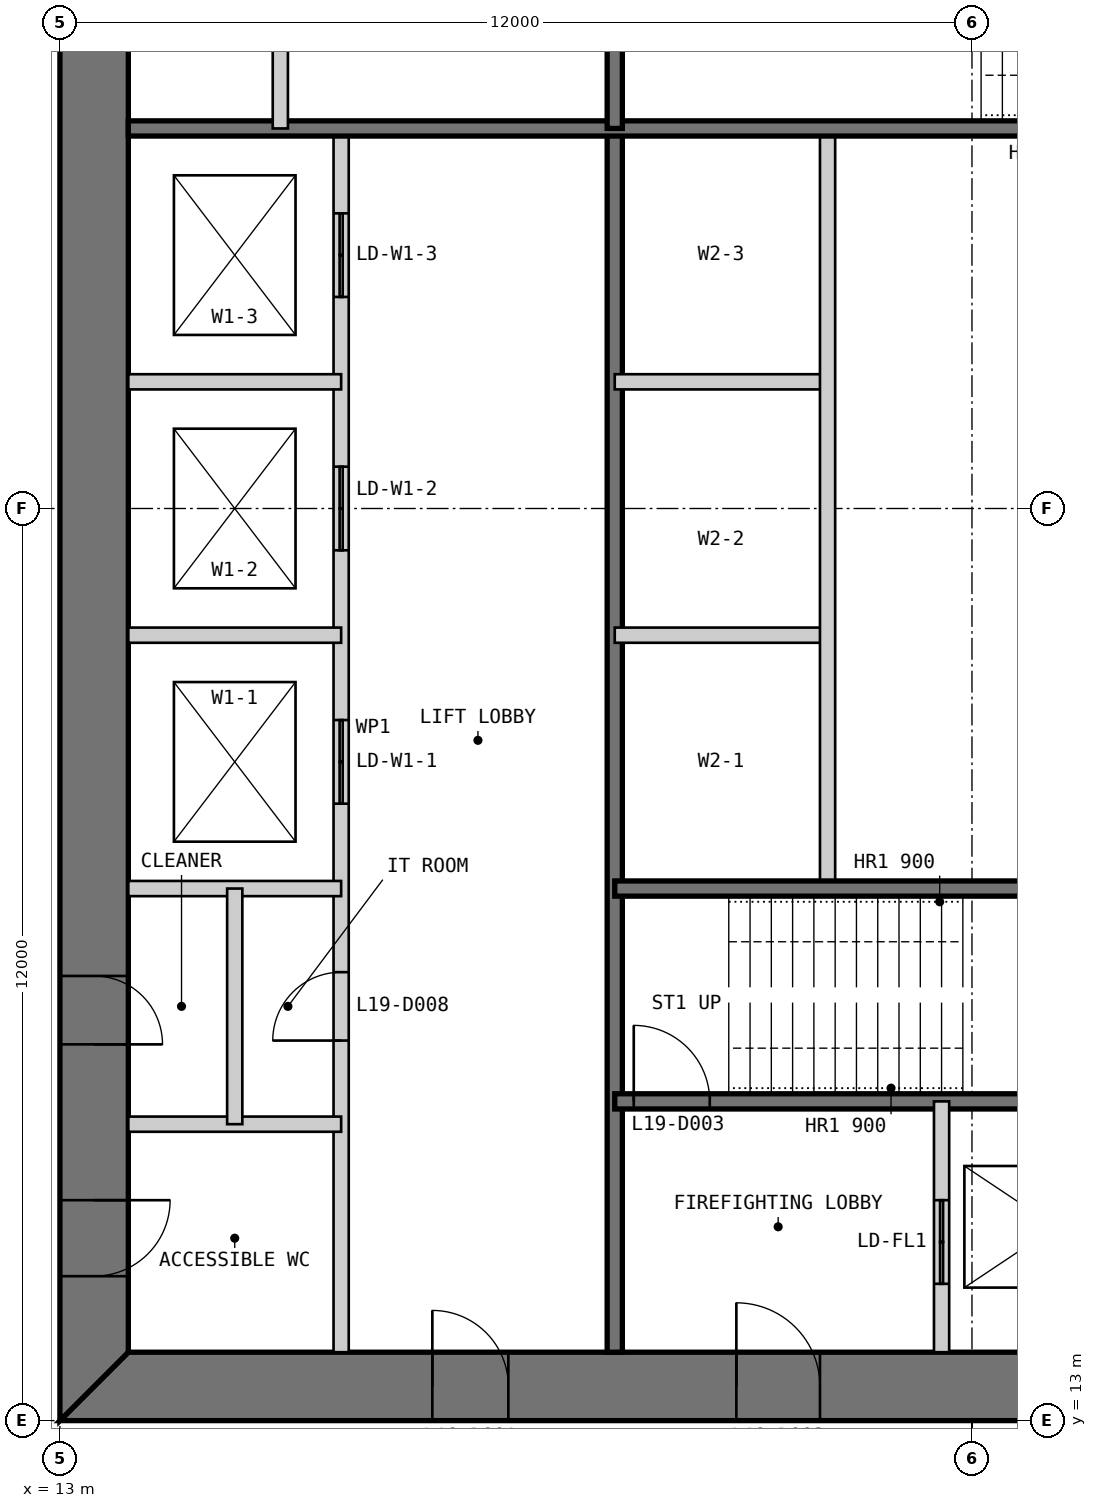
"""IFC4 building model, lengths in metres.
Left out: names, types, materials, properties, quantities, classifications, styles, units other than length and angle.
Written with IfcOpenShell. Run it as: python <this file> out.ifc"""

import sys

from ifc_helpers import new_model, si_unit, direction, frame, frame_2d, origin, place, context, subcontext, project, spatial, polyline, rectangle, outline, extrude, element, fill, save


model = new_model("IFC4")
c1 = context("Model", 3, precision=1e-05, world=origin(), true_north=direction((0.0, 1.0)))
c2 = subcontext(c1, "Body", "Model", "MODEL_VIEW")
j1 = project(units=[si_unit("LENGTHUNIT", "METRE"), si_unit("PLANEANGLEUNIT", "RADIAN")], contexts=[c1])
p1 = place(None, origin())
s1 = spatial("IfcSite", under=j1, at=p1, CompositionType="ELEMENT")
p2 = place(p1, origin())
s2 = spatial("IfcBuilding", under=s1, at=p2, CompositionType="ELEMENT")
p3 = place(p2, frame((0.0, 0.0, 83.0)))
s3 = spatial("IfcBuildingStorey", under=s2, at=p3, CompositionType="ELEMENT", Elevation=83.0)
p4 = place(p3, frame((13.0, 13.45, 0.0), z_axis=(0.0, 0.0, 1.0), x_axis=(1.0, 0.0, 0.0)))
e1 = element("IfcWall", 1, at=p4, inside=s3, PredefinedType="SHEAR", context=c2, shape_type="SweptSolid", body=[
    extrude(outline(polyline([(0.0, -0.45), (24.0, -0.45), (23.1, 0.45), (0.9, 0.45), (0.0, -0.45)])), origin(), (0.0, 0.0, 1.0), 4.0),
])
p5 = place(p4, frame((4.9, 0.0, 0.0)))
e2 = element("IfcOpeningElement", 2, at=p5, cuts=e1, PredefinedType="OPENING", context=c2, shape_type="SweptSolid", body=[
    extrude(rectangle(XDim=1.0, YDim=2.2, at=frame_2d((0.5, 1.1))), frame((0.0, 0.46, 0.0), z_axis=(0.0, -1.0, 0.0), x_axis=(1.0, 0.0, 0.0)), (0.0, 0.0, 1.0), 0.92),
])
p6 = place(p4, frame((8.9, 0.0, 0.0)))
e3 = element("IfcOpeningElement", 3, at=p6, cuts=e1, PredefinedType="OPENING", context=c2, shape_type="SweptSolid", body=[
    extrude(rectangle(XDim=1.1, YDim=2.2, at=frame_2d((0.55, 1.1))), frame((0.0, 0.46, 0.0), z_axis=(0.0, -1.0, 0.0), x_axis=(1.0, 0.0, 0.0)), (0.0, 0.0, 1.0), 0.92),
])
p7 = place(p4, frame((15.05, 0.0, 0.0)))
e4 = element("IfcOpeningElement", 4, at=p7, cuts=e1, PredefinedType="OPENING", context=c2, shape_type="SweptSolid", body=[
    extrude(rectangle(XDim=0.9, YDim=2.2, at=frame_2d((0.45, 1.1))), frame((0.0, 0.46, 0.0), z_axis=(0.0, -1.0, 0.0), x_axis=(1.0, 0.0, 0.0)), (0.0, 0.0, 1.0), 0.92),
])
p8 = place(p4, frame((17.9, 0.0, 0.0)))
e5 = element("IfcOpeningElement", 5, at=p8, cuts=e1, PredefinedType="OPENING", context=c2, shape_type="SweptSolid", body=[
    extrude(rectangle(XDim=1.0, YDim=2.2, at=frame_2d((0.5, 1.1))), frame((0.0, 0.46, 0.0), z_axis=(0.0, -1.0, 0.0), x_axis=(1.0, 0.0, 0.0)), (0.0, 0.0, 1.0), 0.92),
])
p9 = place(p4, frame((21.4, 0.0, 0.0)))
e6 = element("IfcOpeningElement", 6, at=p9, cuts=e1, PredefinedType="OPENING", context=c2, shape_type="SweptSolid", body=[
    extrude(rectangle(XDim=1.0, YDim=2.2, at=frame_2d((0.5, 1.1))), frame((0.0, 0.46, 0.0), z_axis=(0.0, -1.0, 0.0), x_axis=(1.0, 0.0, 0.0)), (0.0, 0.0, 1.0), 0.92),
])
p10 = place(p3, frame((13.45, 36.1, 0.0), z_axis=(0.0, 0.0, 1.0), x_axis=(0.0, -1.0, 0.0)))
e7 = element("IfcWall", 7, at=p10, inside=s3, PredefinedType="SHEAR", context=c2, shape_type="SweptSolid", body=[
    extrude(outline(polyline([(-0.9, -0.45), (23.1, -0.45), (22.2, 0.45), (0.0, 0.45), (-0.9, -0.45)])), origin(), (0.0, 0.0, 1.0), 4.0),
])
p11 = place(p10, frame((20.2, 0.0, 0.0)))
e8 = element("IfcOpeningElement", 8, at=p11, cuts=e7, PredefinedType="OPENING", context=c2, shape_type="SweptSolid", body=[
    extrude(rectangle(XDim=1.0, YDim=2.2, at=frame_2d((0.5, 1.1))), frame((0.0, 0.46, 0.0), z_axis=(0.0, -1.0, 0.0), x_axis=(1.0, 0.0, 0.0)), (0.0, 0.0, 1.0), 0.92),
])
p12 = place(p10, frame((17.25, 0.0, 0.0)))
e9 = element("IfcOpeningElement", 9, at=p12, cuts=e7, PredefinedType="OPENING", context=c2, shape_type="SweptSolid", body=[
    extrude(rectangle(XDim=0.9, YDim=2.2, at=frame_2d((0.45, 1.1))), frame((0.0, 0.46, 0.0), z_axis=(0.0, -1.0, 0.0), x_axis=(1.0, 0.0, 0.0)), (0.0, 0.0, 1.0), 0.92),
])
p13 = place(p3, frame((16.7, 13.9, 0.0), z_axis=(0.0, 0.0, 1.0), x_axis=(0.0, 1.0, 0.0)))
e10 = element("IfcWall", 10, at=p13, inside=s3, PredefinedType="PARTITIONING", context=c2, shape_type="SweptSolid", body=[
    extrude(rectangle(XDim=16.1, YDim=0.2, at=frame_2d((8.05, 0.0))), origin(), (0.0, 0.0, 1.0), 3.8),
])
p14 = place(p13, frame((4.1, 0.0, 0.0)))
e11 = element("IfcOpeningElement", 11, at=p14, cuts=e10, PredefinedType="OPENING", context=c2, shape_type="SweptSolid", body=[
    extrude(rectangle(XDim=0.9, YDim=2.2, at=frame_2d((0.45, 1.1))), frame((0.0, 0.11, 0.0), z_axis=(0.0, -1.0, 0.0), x_axis=(1.0, 0.0, 0.0)), (0.0, 0.0, 1.0), 0.22),
])
p15 = place(p13, frame((7.217, 0.0, 0.0)))
e12 = element("IfcOpeningElement", 12, at=p15, cuts=e10, PredefinedType="OPENING", context=c2, shape_type="SweptSolid", body=[
    extrude(rectangle(XDim=1.1, YDim=2.2, at=frame_2d((0.55, 1.1))), frame((0.0, 0.11, 0.0), z_axis=(0.0, -1.0, 0.0), x_axis=(1.0, 0.0, 0.0)), (0.0, 0.0, 1.0), 0.22),
])
p16 = place(p13, frame((10.55, 0.0, 0.0)))
e13 = element("IfcOpeningElement", 13, at=p16, cuts=e10, PredefinedType="OPENING", context=c2, shape_type="SweptSolid", body=[
    extrude(rectangle(XDim=1.1, YDim=2.2, at=frame_2d((0.55, 1.1))), frame((0.0, 0.11, 0.0), z_axis=(0.0, -1.0, 0.0), x_axis=(1.0, 0.0, 0.0)), (0.0, 0.0, 1.0), 0.22),
])
p17 = place(p13, frame((13.883, 0.0, 0.0)))
e14 = element("IfcOpeningElement", 14, at=p17, cuts=e10, PredefinedType="OPENING", context=c2, shape_type="SweptSolid", body=[
    extrude(rectangle(XDim=1.1, YDim=2.2, at=frame_2d((0.55, 1.1))), frame((0.0, 0.11, 0.0), z_axis=(0.0, -1.0, 0.0), x_axis=(1.0, 0.0, 0.0)), (0.0, 0.0, 1.0), 0.22),
])
p18 = place(p3, frame((20.3, 13.9, 0.0), z_axis=(0.0, 0.0, 1.0), x_axis=(0.0, 1.0, 0.0)))
e15 = element("IfcWall", 15, at=p18, inside=s3, PredefinedType="SOLIDWALL", context=c2, shape_type="SweptSolid", body=[
    extrude(rectangle(XDim=16.1, YDim=0.2, at=frame_2d((8.05, 0.0))), origin(), (0.0, 0.0, 1.0), 3.8),
])
for number, where, z_axis, x_axis in (
    (16, (13.9, 20.0, 0.0), (0.0, 0.0, 1.0), (1.0, 0.0, 0.0)),
    (17, (13.9, 23.333, 0.0), (0.0, 0.0, 1.0), (1.0, 0.0, 0.0)),
    (18, (13.9, 26.667, 0.0), (0.0, 0.0, 1.0), (1.0, 0.0, 0.0)),
    (19, (20.3, 23.333, 0.0), (0.0, 0.0, 1.0), (1.0, 0.0, 0.0)),
    (20, (20.3, 26.667, 0.0), (0.0, 0.0, 1.0), (1.0, 0.0, 0.0)),
):
    element("IfcWall", number, at=place(p3, frame(where, z_axis=z_axis, x_axis=x_axis)), inside=s3, PredefinedType="PARTITIONING", context=c2, shape_type="SweptSolid", body=[
        extrude(rectangle(XDim=2.8, YDim=0.2, at=frame_2d((1.4, 0.0))), origin(), (0.0, 0.0, 1.0), 3.8),
    ])
p19 = place(p3, frame((23.1, 20.0, 0.0), z_axis=(0.0, 0.0, 1.0), x_axis=(0.0, 1.0, 0.0)))
e21 = element("IfcWall", 21, at=p19, inside=s3, PredefinedType="PARTITIONING", context=c2, shape_type="SweptSolid", body=[
    extrude(rectangle(XDim=10.0, YDim=0.2, at=frame_2d((5.0, 0.0))), origin(), (0.0, 0.0, 1.0), 3.8),
])
p20 = place(p3, frame((20.3, 17.2, 0.0), z_axis=(0.0, 0.0, 1.0), x_axis=(1.0, 0.0, 0.0)))
e22 = element("IfcWall", 22, at=p20, inside=s3, PredefinedType="SOLIDWALL", context=c2, shape_type="SweptSolid", body=[
    extrude(rectangle(XDim=9.4, YDim=0.2, at=frame_2d((4.7, 0.0))), origin(), (0.0, 0.0, 1.0), 3.8),
])
p21 = place(p20, frame((0.25, 0.0, 0.0)))
e23 = element("IfcOpeningElement", 23, at=p21, cuts=e22, PredefinedType="OPENING", context=c2, shape_type="SweptSolid", body=[
    extrude(rectangle(XDim=1.0, YDim=2.2, at=frame_2d((0.5, 1.1))), frame((0.0, 0.11, 0.0), z_axis=(0.0, -1.0, 0.0), x_axis=(1.0, 0.0, 0.0)), (0.0, 0.0, 1.0), 0.22),
])
p22 = place(p3, frame((20.3, 20.0, 0.0), z_axis=(0.0, 0.0, 1.0), x_axis=(1.0, 0.0, 0.0)))
e24 = element("IfcWall", 24, at=p22, inside=s3, PredefinedType="SOLIDWALL", context=c2, shape_type="SweptSolid", body=[
    extrude(rectangle(XDim=15.8, YDim=0.2, at=frame_2d((7.9, 0.0))), origin(), (0.0, 0.0, 1.0), 3.8),
])
p23 = place(p3, frame((24.6, 13.9, 0.0), z_axis=(0.0, 0.0, 1.0), x_axis=(0.0, 1.0, 0.0)))
e25 = element("IfcWall", 25, at=p23, inside=s3, PredefinedType="PARTITIONING", context=c2, shape_type="SweptSolid", body=[
    extrude(rectangle(XDim=3.3, YDim=0.2, at=frame_2d((1.65, 0.0))), origin(), (0.0, 0.0, 1.0), 3.8),
])
p24 = place(p23, frame((0.9, 0.0, 0.0)))
e26 = element("IfcOpeningElement", 26, at=p24, cuts=e25, PredefinedType="OPENING", context=c2, shape_type="SweptSolid", body=[
    extrude(rectangle(XDim=1.1, YDim=2.2, at=frame_2d((0.55, 1.1))), frame((0.0, 0.11, 0.0), z_axis=(0.0, -1.0, 0.0), x_axis=(1.0, 0.0, 0.0)), (0.0, 0.0, 1.0), 0.22),
])
p25 = place(p3, frame((13.9, 16.9, 0.0), z_axis=(0.0, 0.0, 1.0), x_axis=(1.0, 0.0, 0.0)))
e27 = element("IfcWall", 27, at=p25, inside=s3, PredefinedType="PARTITIONING", context=c2, shape_type="SweptSolid", body=[
    extrude(rectangle(XDim=2.8, YDim=0.2, at=frame_2d((1.4, 0.0))), origin(), (0.0, 0.0, 1.0), 3.8),
])
p26 = place(p3, frame((15.3, 16.9, 0.0), z_axis=(0.0, 0.0, 1.0), x_axis=(0.0, 1.0, 0.0)))
e28 = element("IfcWall", 28, at=p26, inside=s3, PredefinedType="PARTITIONING", context=c2, shape_type="SweptSolid", body=[
    extrude(rectangle(XDim=3.1, YDim=0.2, at=frame_2d((1.55, 0.0))), origin(), (0.0, 0.0, 1.0), 3.8),
])
p27 = place(p3, frame((29.7, 30.0, 0.0), z_axis=(0.0, 0.0, 1.0), x_axis=(-1.0, 0.0, 0.0)))
e29 = element("IfcWall", 29, at=p27, inside=s3, PredefinedType="SOLIDWALL", context=c2, shape_type="SweptSolid", body=[
    extrude(rectangle(XDim=15.8, YDim=0.2, at=frame_2d((7.9, 0.0))), origin(), (0.0, 0.0, 1.0), 3.8),
])
p28 = place(p3, frame((20.3, 36.1, 0.0), z_axis=(0.0, 0.0, 1.0), x_axis=(0.0, -1.0, 0.0)))
e30 = element("IfcWall", 30, at=p28, inside=s3, PredefinedType="SOLIDWALL", context=c2, shape_type="SweptSolid", body=[
    extrude(rectangle(XDim=6.1, YDim=0.2, at=frame_2d((3.05, 0.0))), origin(), (0.0, 0.0, 1.0), 3.8),
])
p29 = place(p3, frame((15.9, 36.1, 0.0), z_axis=(0.0, 0.0, 1.0), x_axis=(0.0, -1.0, 0.0)))
e31 = element("IfcWall", 31, at=p29, inside=s3, PredefinedType="PARTITIONING", context=c2, shape_type="SweptSolid", body=[
    extrude(rectangle(XDim=6.1, YDim=0.2, at=frame_2d((3.05, 0.0))), origin(), (0.0, 0.0, 1.0), 3.8),
])
p30 = place(p5, origin())
e32 = element("IfcDoor", 32, at=p30, inside=s3, OperationType="SINGLE_SWING_LEFT", PredefinedType="DOOR", context=c2, shape_type="SweptSolid", body=[
    extrude(rectangle(XDim=1.0, YDim=2.2, at=frame_2d((0.5, 1.1))), frame((0.0, 0.025, 0.0), z_axis=(0.0, -1.0, 0.0), x_axis=(1.0, 0.0, 0.0)), (0.0, 0.0, 1.0), 0.05),
    extrude(outline(polyline([(0.0, 0.0), (0.04, 0.0), (0.04, 2.16), (0.96, 2.16), (0.96, 0.0), (1.0, 0.0), (1.0, 2.2), (0.0, 2.2), (0.0, 0.0)])), frame((0.0, 0.3, 0.0), z_axis=(0.0, -1.0, 0.0), x_axis=(1.0, 0.0, 0.0)), (0.0, 0.0, 1.0), 0.6),
])
fill(e2, e32)
p31 = place(p6, origin())
e33 = element("IfcDoor", 33, at=p31, inside=s3, OperationType="SINGLE_SWING_LEFT", PredefinedType="DOOR", context=c2, shape_type="SweptSolid", body=[
    extrude(rectangle(XDim=1.1, YDim=2.2, at=frame_2d((0.55, 1.1))), frame((0.0, 0.025, 0.0), z_axis=(0.0, -1.0, 0.0), x_axis=(1.0, 0.0, 0.0)), (0.0, 0.0, 1.0), 0.05),
    extrude(outline(polyline([(0.0, 0.0), (0.04, 0.0), (0.04, 2.16), (1.06, 2.16), (1.06, 0.0), (1.1, 0.0), (1.1, 2.2), (0.0, 2.2), (0.0, 0.0)])), frame((0.0, 0.3, 0.0), z_axis=(0.0, -1.0, 0.0), x_axis=(1.0, 0.0, 0.0)), (0.0, 0.0, 1.0), 0.6),
])
fill(e3, e33)
p32 = place(p21, origin())
e34 = element("IfcDoor", 34, at=p32, inside=s3, OperationType="SINGLE_SWING_LEFT", PredefinedType="DOOR", context=c2, shape_type="SweptSolid", body=[
    extrude(rectangle(XDim=1.0, YDim=2.2, at=frame_2d((0.5, 1.1))), frame((0.0, 0.025, 0.0), z_axis=(0.0, -1.0, 0.0), x_axis=(1.0, 0.0, 0.0)), (0.0, 0.0, 1.0), 0.05),
])
fill(e23, e34)
p33 = place(p11, origin())
e35 = element("IfcDoor", 35, at=p33, inside=s3, OperationType="SINGLE_SWING_LEFT", PredefinedType="DOOR", context=c2, shape_type="SweptSolid", body=[
    extrude(rectangle(XDim=1.0, YDim=2.2, at=frame_2d((0.5, 1.1))), frame((0.0, 0.025, 0.0), z_axis=(0.0, -1.0, 0.0), x_axis=(1.0, 0.0, 0.0)), (0.0, 0.0, 1.0), 0.05),
    extrude(outline(polyline([(0.0, 0.0), (0.04, 0.0), (0.04, 2.16), (0.96, 2.16), (0.96, 0.0), (1.0, 0.0), (1.0, 2.2), (0.0, 2.2), (0.0, 0.0)])), frame((0.0, 0.3, 0.0), z_axis=(0.0, -1.0, 0.0), x_axis=(1.0, 0.0, 0.0)), (0.0, 0.0, 1.0), 0.6),
])
fill(e8, e35)
p34 = place(p14, origin())
e36 = element("IfcDoor", 36, at=p34, inside=s3, OperationType="SINGLE_SWING_LEFT", PredefinedType="DOOR", context=c2, shape_type="SweptSolid", body=[
    extrude(rectangle(XDim=0.9, YDim=2.2, at=frame_2d((0.45, 1.1))), frame((0.0, 0.025, 0.0), z_axis=(0.0, -1.0, 0.0), x_axis=(1.0, 0.0, 0.0)), (0.0, 0.0, 1.0), 0.05),
])
fill(e11, e36)
p35 = place(p12, origin())
e37 = element("IfcDoor", 37, at=p35, inside=s3, OperationType="SINGLE_SWING_RIGHT", PredefinedType="DOOR", context=c2, shape_type="SweptSolid", body=[
    extrude(rectangle(XDim=0.9, YDim=2.2, at=frame_2d((0.45, 1.1))), frame((0.0, 0.025, 0.0), z_axis=(0.0, -1.0, 0.0), x_axis=(1.0, 0.0, 0.0)), (0.0, 0.0, 1.0), 0.05),
    extrude(outline(polyline([(0.0, 0.0), (0.04, 0.0), (0.04, 2.16), (0.86, 2.16), (0.86, 0.0), (0.9, 0.0), (0.9, 2.2), (0.0, 2.2), (0.0, 0.0)])), frame((0.0, 0.3, 0.0), z_axis=(0.0, -1.0, 0.0), x_axis=(1.0, 0.0, 0.0)), (0.0, 0.0, 1.0), 0.6),
])
fill(e9, e37)
p36 = place(p24, origin())
e38 = element("IfcDoor", 38, at=p36, inside=s3, OperationType="DOUBLE_DOOR_SLIDING", PredefinedType="DOOR", context=c2, shape_type="SweptSolid", body=[
    extrude(rectangle(XDim=1.1, YDim=2.2, at=frame_2d((0.55, 1.1))), frame((0.0, 0.025, 0.0), z_axis=(0.0, -1.0, 0.0), x_axis=(1.0, 0.0, 0.0)), (0.0, 0.0, 1.0), 0.05),
])
fill(e26, e38)
p37 = place(p15, origin())
e39 = element("IfcDoor", 39, at=p37, inside=s3, OperationType="DOUBLE_DOOR_SLIDING", PredefinedType="DOOR", context=c2, shape_type="SweptSolid", body=[
    extrude(rectangle(XDim=1.1, YDim=2.2, at=frame_2d((0.55, 1.1))), frame((0.0, 0.025, 0.0), z_axis=(0.0, -1.0, 0.0), x_axis=(1.0, 0.0, 0.0)), (0.0, 0.0, 1.0), 0.05),
])
fill(e12, e39)
p38 = place(p16, origin())
e40 = element("IfcDoor", 40, at=p38, inside=s3, OperationType="DOUBLE_DOOR_SLIDING", PredefinedType="DOOR", context=c2, shape_type="SweptSolid", body=[
    extrude(rectangle(XDim=1.1, YDim=2.2, at=frame_2d((0.55, 1.1))), frame((0.0, 0.025, 0.0), z_axis=(0.0, -1.0, 0.0), x_axis=(1.0, 0.0, 0.0)), (0.0, 0.0, 1.0), 0.05),
])
fill(e13, e40)
p39 = place(p17, origin())
e41 = element("IfcDoor", 41, at=p39, inside=s3, OperationType="DOUBLE_DOOR_SLIDING", PredefinedType="DOOR", context=c2, shape_type="SweptSolid", body=[
    extrude(rectangle(XDim=1.1, YDim=2.2, at=frame_2d((0.55, 1.1))), frame((0.0, 0.025, 0.0), z_axis=(0.0, -1.0, 0.0), x_axis=(1.0, 0.0, 0.0)), (0.0, 0.0, 1.0), 0.05),
])
fill(e14, e41)
save(model, sys.argv[1])
